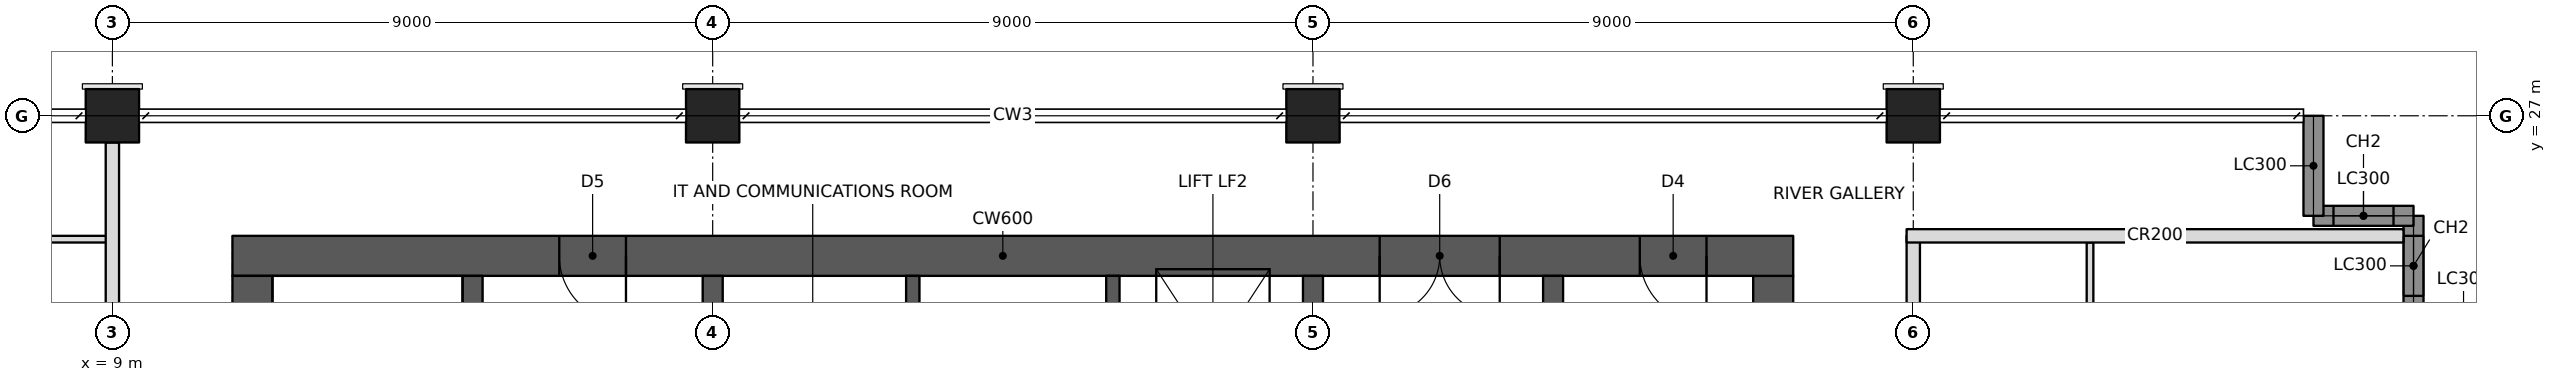
"""IFC4 building model, lengths in metres.
Left out: names, types, materials, properties, quantities, classifications, styles, units other than length and angle.
Written with IfcOpenShell. Run it as: python <this file> out.ifc"""

import sys

from ifc_helpers import new_model, si_unit, direction, frame, frame_2d, origin, origin_2d, place, context, subcontext, project, spatial, rectangle, hollow_rectangle, extrude, element, fill, save


model = new_model("IFC4")
c1 = context("Model", 3, precision=1e-05, world=origin(), true_north=direction((0.0, 1.0)))
c2 = subcontext(c1, "Body", "Model", "MODEL_VIEW")
j1 = project(units=[si_unit("LENGTHUNIT", "METRE"), si_unit("PLANEANGLEUNIT", "RADIAN")], contexts=[c1])
p1 = place(None, origin())
s1 = spatial("IfcSite", under=j1, at=p1, CompositionType="ELEMENT")
p2 = place(p1, origin())
s2 = spatial("IfcBuilding", under=s1, at=p2, CompositionType="ELEMENT")
p3 = place(p2, frame((0.0, 0.0, 208.0)))
s3 = spatial("IfcBuildingStorey", under=s2, at=p3, CompositionType="ELEMENT", Elevation=208.0)
for number, where, z_axis, x_axis in (
    (1, (9.0, 27.0, 0.0), (0.0, 0.0, 1.0), (1.0, 0.0, 0.0)),
    (2, (18.0, 27.0, 0.0), (0.0, 0.0, 1.0), (1.0, 0.0, 0.0)),
    (3, (27.0, 27.0, 0.0), (0.0, 0.0, 1.0), (1.0, 0.0, 0.0)),
    (4, (36.0, 27.0, 0.0), (0.0, 0.0, 1.0), (1.0, 0.0, 0.0)),
):
    element("IfcColumn", number, at=place(p3, frame(where, z_axis=z_axis, x_axis=x_axis)), inside=s3, PredefinedType="COLUMN", context=c2, shape_type="SweptSolid", body=[
        extrude(hollow_rectangle(XDim=0.8, YDim=0.8, WallThickness=0.06, at=origin_2d()), origin(), (0.0, 0.0, 1.0), 3.4),
    ])
p4 = place(p3, frame((10.8, 24.9, 0.0), z_axis=(0.0, 0.0, 1.0), x_axis=(1.0, 0.0, 0.0)))
e5 = element("IfcWall", 5, at=p4, inside=s3, PredefinedType="SHEAR", context=c2, shape_type="SweptSolid", body=[
    extrude(rectangle(XDim=23.4, YDim=0.6, at=frame_2d((11.7, 0.0))), origin(), (0.0, 0.0, 1.0), 3.4),
])
p5 = place(p4, frame((17.2, 0.0, 0.0)))
e6 = element("IfcOpeningElement", 6, at=p5, cuts=e5, PredefinedType="OPENING", context=c2, shape_type="SweptSolid", body=[
    extrude(rectangle(XDim=1.8, YDim=2.1, at=frame_2d((0.9, 1.05))), frame((0.0, 0.31, 0.0), z_axis=(0.0, -1.0, 0.0), x_axis=(1.0, 0.0, 0.0)), (0.0, 0.0, 1.0), 0.62),
])
p6 = place(p4, frame((21.1, 0.0, 0.0)))
e7 = element("IfcOpeningElement", 7, at=p6, cuts=e5, PredefinedType="OPENING", context=c2, shape_type="SweptSolid", body=[
    extrude(rectangle(XDim=1.0, YDim=2.1, at=frame_2d((0.5, 1.05))), frame((0.0, 0.31, 0.0), z_axis=(0.0, -1.0, 0.0), x_axis=(1.0, 0.0, 0.0)), (0.0, 0.0, 1.0), 0.62),
])
p7 = place(p4, frame((4.9, 0.0, 0.0)))
e8 = element("IfcOpeningElement", 8, at=p7, cuts=e5, PredefinedType="OPENING", context=c2, shape_type="SweptSolid", body=[
    extrude(rectangle(XDim=1.0, YDim=2.1, at=frame_2d((0.5, 1.05))), frame((0.0, 0.31, 0.0), z_axis=(0.0, -1.0, 0.0), x_axis=(1.0, 0.0, 0.0)), (0.0, 0.0, 1.0), 0.62),
])
for number, where, z_axis, x_axis in (
    (9, (11.1, 11.4, 0.0), (0.0, 0.0, 1.0), (0.0, 1.0, 0.0)),
    (10, (33.9, 11.4, 0.0), (0.0, 0.0, 1.0), (0.0, 1.0, 0.0)),
):
    element("IfcWall", number, at=place(p3, frame(where, z_axis=z_axis, x_axis=x_axis)), inside=s3, PredefinedType="SHEAR", context=c2, shape_type="SweptSolid", body=[
        extrude(rectangle(XDim=13.2, YDim=0.6, at=frame_2d((6.6, 0.0))), origin(), (0.0, 0.0, 1.0), 3.4),
    ])
p8 = place(p3, frame((14.4, 11.4, 0.0), z_axis=(0.0, 0.0, 1.0), x_axis=(0.0, 1.0, 0.0)))
e11 = element("IfcWall", 11, at=p8, inside=s3, PredefinedType="SHEAR", context=c2, shape_type="SweptSolid", body=[
    extrude(rectangle(XDim=13.2, YDim=0.3, at=frame_2d((6.6, 0.0))), origin(), (0.0, 0.0, 1.0), 3.4),
])
p9 = place(p3, frame((18.0, 11.4, 0.0), z_axis=(0.0, 0.0, 1.0), x_axis=(0.0, 1.0, 0.0)))
e12 = element("IfcWall", 12, at=p9, inside=s3, PredefinedType="SHEAR", context=c2, shape_type="SweptSolid", body=[
    extrude(rectangle(XDim=13.2, YDim=0.3, at=frame_2d((6.6, 0.0))), origin(), (0.0, 0.0, 1.0), 3.4),
])
p10 = place(p9, frame((3.6, 0.0, 0.0)))
e13 = element("IfcOpeningElement", 13, at=p10, cuts=e12, PredefinedType="OPENING", context=c2, shape_type="SweptSolid", body=[
    extrude(rectangle(XDim=1.0, YDim=2.1, at=frame_2d((0.5, 1.05))), frame((0.0, 0.16, 0.0), z_axis=(0.0, -1.0, 0.0), x_axis=(1.0, 0.0, 0.0)), (0.0, 0.0, 1.0), 0.32),
])
p11 = place(p9, frame((7.85, 0.0, 0.0)))
e14 = element("IfcOpeningElement", 14, at=p11, cuts=e12, PredefinedType="OPENING", context=c2, shape_type="SweptSolid", body=[
    extrude(rectangle(XDim=1.1, YDim=2.1, at=frame_2d((0.55, 1.05))), frame((0.0, 0.16, 0.0), z_axis=(0.0, -1.0, 0.0), x_axis=(1.0, 0.0, 0.0)), (0.0, 0.0, 1.0), 0.32),
])
p12 = place(p3, frame((27.0, 21.75, 0.0), z_axis=(0.0, 0.0, 1.0), x_axis=(0.0, 1.0, 0.0)))
e15 = element("IfcWall", 15, at=p12, inside=s3, PredefinedType="SHEAR", context=c2, shape_type="SweptSolid", body=[
    extrude(rectangle(XDim=2.85, YDim=0.3, at=frame_2d((1.425, 0.0))), origin(), (0.0, 0.0, 1.0), 3.4),
])
for number, where, z_axis, x_axis in (
    (16, (21.0, 21.75, 0.0), (0.0, 0.0, 1.0), (0.0, 1.0, 0.0)),
    (17, (24.0, 21.75, 0.0), (0.0, 0.0, 1.0), (0.0, 1.0, 0.0)),
):
    element("IfcWall", number, at=place(p3, frame(where, z_axis=z_axis, x_axis=x_axis)), inside=s3, PredefinedType="SHEAR", context=c2, shape_type="SweptSolid", body=[
        extrude(rectangle(XDim=2.85, YDim=0.2, at=frame_2d((1.425, 0.0))), origin(), (0.0, 0.0, 1.0), 3.4),
    ])
p13 = place(p3, frame((30.6, 11.4, 0.0), z_axis=(0.0, 0.0, 1.0), x_axis=(0.0, 1.0, 0.0)))
e18 = element("IfcWall", 18, at=p13, inside=s3, PredefinedType="SHEAR", context=c2, shape_type="SweptSolid", body=[
    extrude(rectangle(XDim=13.2, YDim=0.3, at=frame_2d((6.6, 0.0))), origin(), (0.0, 0.0, 1.0), 3.4),
])
p14 = place(p3, frame((43.5, 24.0, 0.0), z_axis=(0.0, 0.0, 1.0), x_axis=(0.0, 1.0, 0.0)))
e19 = element("IfcWall", 19, at=p14, inside=s3, PredefinedType="SOLIDWALL", context=c2, shape_type="SweptSolid", body=[
    extrude(rectangle(XDim=1.5, YDim=0.3, at=frame_2d((0.75, 0.0))), origin(), (0.0, 0.0, 1.0), 3.2),
])
p15 = place(p14, frame((0.3, 0.0, 0.6)))
e20 = element("IfcOpeningElement", 20, at=p15, cuts=e19, PredefinedType="OPENING", context=c2, shape_type="SweptSolid", body=[
    extrude(rectangle(XDim=0.9, YDim=2.2, at=frame_2d((0.45, 1.1))), frame((0.0, 0.16, 0.0), z_axis=(0.0, -1.0, 0.0), x_axis=(1.0, 0.0, 0.0)), (0.0, 0.0, 1.0), 0.32),
])
p16 = place(p3, frame((43.5, 25.5, 0.0), z_axis=(0.0, 0.0, 1.0), x_axis=(-1.0, 0.0, 0.0)))
e21 = element("IfcWall", 21, at=p16, inside=s3, PredefinedType="SOLIDWALL", context=c2, shape_type="SweptSolid", body=[
    extrude(rectangle(XDim=1.5, YDim=0.3, at=frame_2d((0.75, 0.0))), origin(), (0.0, 0.0, 1.0), 3.2),
])
p17 = place(p16, frame((0.3, 0.0, 0.6)))
e22 = element("IfcOpeningElement", 22, at=p17, cuts=e21, PredefinedType="OPENING", context=c2, shape_type="SweptSolid", body=[
    extrude(rectangle(XDim=0.9, YDim=2.2, at=frame_2d((0.45, 1.1))), frame((0.0, 0.16, 0.0), z_axis=(0.0, -1.0, 0.0), x_axis=(1.0, 0.0, 0.0)), (0.0, 0.0, 1.0), 0.32),
])
p18 = place(p3, frame((42.0, 25.5, 0.0), z_axis=(0.0, 0.0, 1.0), x_axis=(0.0, 1.0, 0.0)))
e23 = element("IfcWall", 23, at=p18, inside=s3, PredefinedType="SOLIDWALL", context=c2, shape_type="SweptSolid", body=[
    extrude(rectangle(XDim=1.5, YDim=0.3, at=frame_2d((0.75, 0.0))), origin(), (0.0, 0.0, 1.0), 2.42),
])
p19 = place(p3, frame((9.0, 18.4, 0.0), z_axis=(0.0, 0.0, 1.0), x_axis=(0.0, 1.0, 0.0)))
e24 = element("IfcWall", 24, at=p19, inside=s3, PredefinedType="PARTITIONING", context=c2, shape_type="SweptSolid", body=[
    extrude(rectangle(XDim=8.2, YDim=0.2, at=frame_2d((4.1, 0.0))), origin(), (0.0, 0.0, 1.0), 2.405),
])
p20 = place(p3, frame((36.0, 18.4, 0.0), z_axis=(0.0, 0.0, 1.0), x_axis=(0.0, 1.0, 0.0)))
e25 = element("IfcWall", 25, at=p20, inside=s3, PredefinedType="PARTITIONING", context=c2, shape_type="SweptSolid", body=[
    extrude(rectangle(XDim=6.8, YDim=0.2, at=frame_2d((3.4, 0.0))), origin(), (0.0, 0.0, 1.0), 2.405),
])
p21 = place(p3, frame((35.9, 25.2, 0.0), z_axis=(0.0, 0.0, 1.0), x_axis=(1.0, 0.0, 0.0)))
e26 = element("IfcWall", 26, at=p21, inside=s3, PredefinedType="PARTITIONING", context=c2, shape_type="SweptSolid", body=[
    extrude(rectangle(XDim=7.45, YDim=0.2, at=frame_2d((3.725, 0.0))), origin(), (0.0, 0.0, 1.0), 2.404),
])
p22 = place(p3, frame((38.65, 21.65, 0.0), z_axis=(0.0, 0.0, 1.0), x_axis=(0.0, 1.0, 0.0)))
e27 = element("IfcWall", 27, at=p22, inside=s3, PredefinedType="PARTITIONING", context=c2, shape_type="SweptSolid", body=[
    extrude(rectangle(XDim=3.45, YDim=0.1, at=frame_2d((1.725, 0.0))), origin(), (0.0, 0.0, 1.0), 3.2),
])
p23 = place(p3, frame((6.35, 25.15, 0.0), z_axis=(0.0, 0.0, 1.0), x_axis=(1.0, 0.0, 0.0)))
e28 = element("IfcWall", 28, at=p23, inside=s3, PredefinedType="PARTITIONING", context=c2, shape_type="SweptSolid", body=[
    extrude(rectangle(XDim=2.6, YDim=0.1, at=frame_2d((1.3, 0.0))), origin(), (0.0, 0.0, 1.0), 2.404),
])
p24 = place(p15, origin())
e29 = element("IfcWindow", 29, at=p24, inside=s3, PartitioningType="SINGLE_PANEL", PredefinedType="WINDOW", context=c2, shape_type="SweptSolid", body=[
    extrude(rectangle(XDim=0.9, YDim=2.2, at=frame_2d((0.45, 1.1))), frame((0.0, 0.03, 0.0), z_axis=(0.0, -1.0, 0.0), x_axis=(1.0, 0.0, 0.0)), (0.0, 0.0, 1.0), 0.06),
])
fill(e20, e29)
p25 = place(p17, origin())
e30 = element("IfcWindow", 30, at=p25, inside=s3, PartitioningType="SINGLE_PANEL", PredefinedType="WINDOW", context=c2, shape_type="SweptSolid", body=[
    extrude(rectangle(XDim=0.9, YDim=2.2, at=frame_2d((0.45, 1.1))), frame((0.0, 0.03, 0.0), z_axis=(0.0, -1.0, 0.0), x_axis=(1.0, 0.0, 0.0)), (0.0, 0.0, 1.0), 0.06),
])
fill(e22, e30)
p26 = place(p5, frame((1.8, 0.0, 0.0), z_axis=(0.0, 0.0, 1.0), x_axis=(-1.0, 0.0, 0.0)))
e31 = element("IfcDoor", 31, at=p26, inside=s3, OperationType="DOUBLE_DOOR_SINGLE_SWING", PredefinedType="DOOR", context=c2, shape_type="SweptSolid", body=[
    extrude(rectangle(XDim=1.8, YDim=2.1, at=frame_2d((0.9, 1.05))), frame((0.0, 0.025, 0.0), z_axis=(0.0, -1.0, 0.0), x_axis=(1.0, 0.0, 0.0)), (0.0, 0.0, 1.0), 0.05),
])
fill(e6, e31)
p27 = place(p6, frame((1.0, 0.0, 0.0), z_axis=(0.0, 0.0, 1.0), x_axis=(-1.0, 0.0, 0.0)))
e32 = element("IfcDoor", 32, at=p27, inside=s3, OperationType="SINGLE_SWING_LEFT", PredefinedType="DOOR", context=c2, shape_type="SweptSolid", body=[
    extrude(rectangle(XDim=1.0, YDim=2.1, at=frame_2d((0.5, 1.05))), frame((0.0, 0.025, 0.0), z_axis=(0.0, -1.0, 0.0), x_axis=(1.0, 0.0, 0.0)), (0.0, 0.0, 1.0), 0.05),
])
fill(e7, e32)
p28 = place(p7, frame((1.0, 0.0, 0.0), z_axis=(0.0, 0.0, 1.0), x_axis=(-1.0, 0.0, 0.0)))
e33 = element("IfcDoor", 33, at=p28, inside=s3, OperationType="SINGLE_SWING_LEFT", PredefinedType="DOOR", context=c2, shape_type="SweptSolid", body=[
    extrude(rectangle(XDim=1.0, YDim=2.1, at=frame_2d((0.5, 1.05))), frame((0.0, 0.025, 0.0), z_axis=(0.0, -1.0, 0.0), x_axis=(1.0, 0.0, 0.0)), (0.0, 0.0, 1.0), 0.05),
])
fill(e8, e33)
save(model, sys.argv[1])
